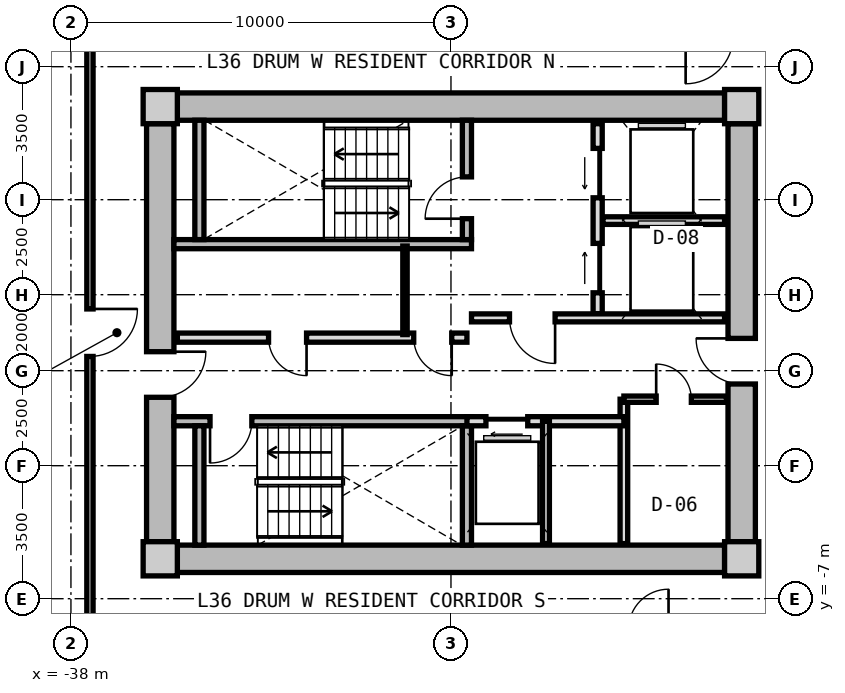
"""IFC4 building model, lengths in metres.
Left out: names, types, materials, properties, quantities, classifications, styles, units other than length and angle.
Written with IfcOpenShell. Run it as: python <this file> out.ifc"""

import sys

from ifc_helpers import new_model, si_unit, direction, frame, frame_2d, origin, origin_2d, place, context, subcontext, project, spatial, rectangle, extrude, source, transform, mapped, element, fill, save


model = new_model("IFC4")
c1 = context("Model", 3, precision=1e-05, world=origin(), true_north=direction((0.0, 1.0)))
c2 = subcontext(c1, "Body", "Model", "MODEL_VIEW")
j1 = project(units=[si_unit("LENGTHUNIT", "METRE"), si_unit("PLANEANGLEUNIT", "RADIAN")], contexts=[c1])
p1 = place(None, origin())
s1 = spatial("IfcSite", under=j1, at=p1, CompositionType="ELEMENT")
p2 = place(p1, origin())
s2 = spatial("IfcBuilding", under=s1, at=p2, CompositionType="ELEMENT")
p3 = place(p2, frame((0.0, 0.0, 117.6)))
s3 = spatial("IfcBuildingStorey", under=s2, at=p3, CompositionType="ELEMENT", Elevation=117.6)
m1 = source(origin(), c2, "Body", "SweptSolid", [
    extrude(rectangle(XDim=0.9, YDim=0.9, at=origin_2d()), origin(), (0.0, 0.0, 1.0), 3.05),
])
for number, where, z_axis, x_axis in (
    (1, (-35.65, -5.95, 0.0), (0.0, 0.0, 1.0), (1.0, 0.0, 0.0)),
    (2, (-20.35, -5.95, 0.0), (0.0, 0.0, 1.0), (1.0, 0.0, 0.0)),
    (3, (-20.35, 5.95, 0.0), (0.0, 0.0, 1.0), (1.0, 0.0, 0.0)),
    (4, (-35.65, 5.95, 0.0), (0.0, 0.0, 1.0), (1.0, 0.0, 0.0)),
):
    element("IfcColumn", number, at=place(p3, frame(where, z_axis=z_axis, x_axis=x_axis)), inside=s3, PredefinedType="COLUMN", context=c2, shape_type="MappedRepresentation", body=[
        mapped(m1, transform((0.0, 0.0, 0.0), x_axis=(1.0, 0.0, 0.0), y_axis=(0.0, 1.0, 0.0), z_axis=(0.0, 0.0, 1.0), scale=1.0)),
    ])
m2 = source(origin(), c2, "Body", "SweptSolid", [
    extrude(rectangle(XDim=14.4, YDim=0.72, at=frame_2d((7.2, 0.0))), origin(), (0.0, 0.0, 1.0), 2.79),
])
for number, where, z_axis, x_axis in (
    (5, (-35.2, 5.95, 0.0), (0.0, 0.0, 1.0), (1.0, 0.0, 0.0)),
    (6, (-20.8, -5.95, 0.0), (0.0, 0.0, 1.0), (-1.0, 0.0, 0.0)),
):
    element("IfcWall", number, at=place(p3, frame(where, z_axis=z_axis, x_axis=x_axis)), inside=s3, PredefinedType="SHEAR", context=c2, shape_type="MappedRepresentation", body=[
        mapped(m2, transform((0.0, 0.0, 0.0), x_axis=(1.0, 0.0, 0.0), y_axis=(0.0, 1.0, 0.0), z_axis=(0.0, 0.0, 1.0), scale=1.0)),
    ])
m3 = source(origin(), c2, "Body", "SweptSolid", [
    extrude(rectangle(XDim=11.0, YDim=0.72, at=frame_2d((5.5, 0.0))), origin(), (0.0, 0.0, 1.0), 2.79),
])
p4 = place(p3, frame((-35.65, -5.5, 0.0), z_axis=(0.0, 0.0, 1.0), x_axis=(0.0, 1.0, 0.0)))
e7 = element("IfcWall", 7, at=p4, inside=s3, PredefinedType="SHEAR", context=c2, shape_type="MappedRepresentation", body=[
    mapped(m3, transform((0.0, 0.0, 0.0), x_axis=(1.0, 0.0, 0.0), y_axis=(0.0, 1.0, 0.0), z_axis=(0.0, 0.0, 1.0), scale=1.0)),
])
p5 = place(p4, frame((3.8, 0.0, 0.0)))
e8 = element("IfcOpeningElement", 8, at=p5, cuts=e7, PredefinedType="OPENING", context=c2, shape_type="SweptSolid", body=[
    extrude(rectangle(XDim=1.2, YDim=2.15, at=frame_2d((0.6, 1.075))), frame((0.0, 0.37, 0.0), z_axis=(0.0, -1.0, 0.0), x_axis=(1.0, 0.0, 0.0)), (0.0, 0.0, 1.0), 0.74),
])
p6 = place(p3, frame((-20.35, 5.5, 0.0), z_axis=(0.0, 0.0, 1.0), x_axis=(0.0, -1.0, 0.0)))
e9 = element("IfcWall", 9, at=p6, inside=s3, PredefinedType="SHEAR", context=c2, shape_type="MappedRepresentation", body=[
    mapped(m3, transform((0.0, 0.0, 0.0), x_axis=(1.0, 0.0, 0.0), y_axis=(0.0, 1.0, 0.0), z_axis=(0.0, 0.0, 1.0), scale=1.0)),
])
p7 = place(p6, frame((5.65, 0.0, 0.0)))
e10 = element("IfcOpeningElement", 10, at=p7, cuts=e9, PredefinedType="OPENING", context=c2, shape_type="SweptSolid", body=[
    extrude(rectangle(XDim=1.2, YDim=2.15, at=frame_2d((0.6, 1.075))), frame((0.0, 0.37, 0.0), z_axis=(0.0, -1.0, 0.0), x_axis=(1.0, 0.0, 0.0)), (0.0, 0.0, 1.0), 0.74),
])
m4 = source(origin(), c2, "Body", "SweptSolid", [
    extrude(rectangle(XDim=7.83, YDim=0.24, at=frame_2d((3.915, 0.0))), origin(), (0.0, 0.0, 1.0), 2.79),
])
p8 = place(p3, frame((-35.29, 2.33, 0.0), z_axis=(0.0, 0.0, 1.0), x_axis=(1.0, 0.0, 0.0)))
e11 = element("IfcWall", 11, at=p8, inside=s3, PredefinedType="PARTITIONING", context=c2, shape_type="MappedRepresentation", body=[
    mapped(m4, transform((0.0, 0.0, 0.0), x_axis=(1.0, 0.0, 0.0), y_axis=(0.0, 1.0, 0.0), z_axis=(0.0, 0.0, 1.0), scale=1.0)),
])
m5 = source(origin(), c2, "Body", "SweptSolid", [
    extrude(rectangle(XDim=3.14, YDim=0.24, at=frame_2d((1.57, 0.0))), origin(), (0.0, 0.0, 1.0), 2.79),
])
p9 = place(p3, frame((-34.62, 2.45, 0.0), z_axis=(0.0, 0.0, 1.0), x_axis=(0.0, 1.0, 0.0)))
e12 = element("IfcWall", 12, at=p9, inside=s3, PredefinedType="PARTITIONING", context=c2, shape_type="MappedRepresentation", body=[
    mapped(m5, transform((0.0, 0.0, 0.0), x_axis=(1.0, 0.0, 0.0), y_axis=(0.0, 1.0, 0.0), z_axis=(0.0, 0.0, 1.0), scale=1.0)),
])
p10 = place(p3, frame((-27.58, 2.45, 0.0), z_axis=(0.0, 0.0, 1.0), x_axis=(0.0, 1.0, 0.0)))
e13 = element("IfcWall", 13, at=p10, inside=s3, PredefinedType="PARTITIONING", context=c2, shape_type="MappedRepresentation", body=[
    mapped(m5, transform((0.0, 0.0, 0.0), x_axis=(1.0, 0.0, 0.0), y_axis=(0.0, 1.0, 0.0), z_axis=(0.0, 0.0, 1.0), scale=1.0)),
])
p11 = place(p10, frame((0.55, 0.0, 0.0)))
e14 = element("IfcOpeningElement", 14, at=p11, cuts=e13, PredefinedType="OPENING", context=c2, shape_type="SweptSolid", body=[
    extrude(rectangle(XDim=1.1, YDim=2.15, at=frame_2d((0.55, 1.075))), frame((0.0, 0.13, 0.0), z_axis=(0.0, -1.0, 0.0), x_axis=(1.0, 0.0, 0.0)), (0.0, 0.0, 1.0), 0.26),
])
p12 = place(p3, frame((-35.29, -2.33, 0.0), z_axis=(0.0, 0.0, 1.0), x_axis=(1.0, 0.0, 0.0)))
e15 = element("IfcWall", 15, at=p12, inside=s3, PredefinedType="PARTITIONING", context=c2, shape_type="MappedRepresentation", body=[
    mapped(m4, transform((0.0, 0.0, 0.0), x_axis=(1.0, 0.0, 0.0), y_axis=(0.0, 1.0, 0.0), z_axis=(0.0, 0.0, 1.0), scale=1.0)),
])
p13 = place(p12, frame((0.95, 0.0, 0.0)))
e16 = element("IfcOpeningElement", 16, at=p13, cuts=e15, PredefinedType="OPENING", context=c2, shape_type="SweptSolid", body=[
    extrude(rectangle(XDim=1.1, YDim=2.15, at=frame_2d((0.55, 1.075))), frame((0.0, 0.13, 0.0), z_axis=(0.0, -1.0, 0.0), x_axis=(1.0, 0.0, 0.0)), (0.0, 0.0, 1.0), 0.26),
])
for number, where, z_axis, x_axis in (
    (17, (-34.62, -5.59, 0.0), (0.0, 0.0, 1.0), (0.0, 1.0, 0.0)),
    (18, (-27.58, -5.59, 0.0), (0.0, 0.0, 1.0), (0.0, 1.0, 0.0)),
):
    element("IfcWall", number, at=place(p3, frame(where, z_axis=z_axis, x_axis=x_axis)), inside=s3, PredefinedType="PARTITIONING", context=c2, shape_type="MappedRepresentation", body=[
        mapped(m5, transform((0.0, 0.0, 0.0), x_axis=(1.0, 0.0, 0.0), y_axis=(0.0, 1.0, 0.0), z_axis=(0.0, 0.0, 1.0), scale=1.0)),
    ])
m6 = source(origin(), c2, "Body", "SweptSolid", [
    extrude(rectangle(XDim=5.0, YDim=0.24, at=frame_2d((2.5, 0.0))), origin(), (0.0, 0.0, 1.0), 2.775),
])
p14 = place(p3, frame((-24.14, 0.5, 0.0), z_axis=(0.0, 0.0, 1.0), x_axis=(0.0, 1.0, 0.0)))
e19 = element("IfcWall", 19, at=p14, inside=s3, PredefinedType="PARTITIONING", context=c2, shape_type="MappedRepresentation", body=[
    mapped(m6, transform((0.0, 0.0, 0.0), x_axis=(1.0, 0.0, 0.0), y_axis=(0.0, 1.0, 0.0), z_axis=(0.0, 0.0, 1.0), scale=1.0)),
])
p15 = place(p14, frame((3.05, 0.0, 0.0)))
e20 = element("IfcOpeningElement", 20, at=p15, cuts=e19, PredefinedType="OPENING", context=c2, shape_type="SweptSolid", body=[
    extrude(rectangle(XDim=1.3, YDim=2.2, at=frame_2d((0.65, 1.1))), frame((0.0, 0.13, 0.0), z_axis=(0.0, -1.0, 0.0), x_axis=(1.0, 0.0, 0.0)), (0.0, 0.0, 1.0), 0.26),
])
p16 = place(p14, frame((0.55, 0.0, 0.0)))
e21 = element("IfcOpeningElement", 21, at=p16, cuts=e19, PredefinedType="OPENING", context=c2, shape_type="SweptSolid", body=[
    extrude(rectangle(XDim=1.3, YDim=2.2, at=frame_2d((0.65, 1.1))), frame((0.0, 0.13, 0.0), z_axis=(0.0, -1.0, 0.0), x_axis=(1.0, 0.0, 0.0)), (0.0, 0.0, 1.0), 0.26),
])
m7 = source(origin(), c2, "Body", "SweptSolid", [
    extrude(rectangle(XDim=3.2, YDim=0.2, at=frame_2d((1.6, 0.0))), origin(), (0.0, 0.0, 1.0), 2.775),
])
p17 = place(p3, frame((-24.0, 2.95, 0.0), z_axis=(0.0, 0.0, 1.0), x_axis=(1.0, 0.0, 0.0)))
e22 = element("IfcWall", 22, at=p17, inside=s3, PredefinedType="PARTITIONING", context=c2, shape_type="MappedRepresentation", body=[
    mapped(m7, transform((0.0, 0.0, 0.0), x_axis=(1.0, 0.0, 0.0), y_axis=(0.0, 1.0, 0.0), z_axis=(0.0, 0.0, 1.0), scale=1.0)),
])
m8 = source(origin(), c2, "Body", "SweptSolid", [
    extrude(rectangle(XDim=6.66, YDim=0.21, at=frame_2d((3.33, 0.0))), origin(), (0.0, 0.0, 1.0), 2.775),
])
p18 = place(p3, frame((-27.46, 0.39, 0.0), z_axis=(0.0, 0.0, 1.0), x_axis=(1.0, 0.0, 0.0)))
e23 = element("IfcWall", 23, at=p18, inside=s3, PredefinedType="PARTITIONING", context=c2, shape_type="MappedRepresentation", body=[
    mapped(m8, transform((0.0, 0.0, 0.0), x_axis=(1.0, 0.0, 0.0), y_axis=(0.0, 1.0, 0.0), z_axis=(0.0, 0.0, 1.0), scale=1.0)),
])
p19 = place(p18, frame((1.0, 0.0, 0.0)))
e24 = element("IfcOpeningElement", 24, at=p19, cuts=e23, PredefinedType="OPENING", context=c2, shape_type="SweptSolid", body=[
    extrude(rectangle(XDim=1.2, YDim=2.15, at=frame_2d((0.6, 1.075))), frame((0.0, 0.115, 0.0), z_axis=(0.0, -1.0, 0.0), x_axis=(1.0, 0.0, 0.0)), (0.0, 0.0, 1.0), 0.23),
])
m9 = source(origin(), c2, "Body", "SweptSolid", [
    extrude(rectangle(XDim=7.62, YDim=0.24, at=frame_2d((3.81, 0.0))), origin(), (0.0, 0.0, 1.0), 2.775),
])
p20 = place(p3, frame((-35.2, -0.13, 0.0), z_axis=(0.0, 0.0, 1.0), x_axis=(1.0, 0.0, 0.0)))
e25 = element("IfcWall", 25, at=p20, inside=s3, PredefinedType="PARTITIONING", context=c2, shape_type="MappedRepresentation", body=[
    mapped(m9, transform((0.0, 0.0, 0.0), x_axis=(1.0, 0.0, 0.0), y_axis=(0.0, 1.0, 0.0), z_axis=(0.0, 0.0, 1.0), scale=1.0)),
])
p21 = place(p20, frame((6.22, 0.0, 0.0)))
e26 = element("IfcOpeningElement", 26, at=p21, cuts=e25, PredefinedType="OPENING", context=c2, shape_type="SweptSolid", body=[
    extrude(rectangle(XDim=1.0, YDim=2.1, at=frame_2d((0.5, 1.05))), frame((0.0, 0.13, 0.0), z_axis=(0.0, -1.0, 0.0), x_axis=(1.0, 0.0, 0.0)), (0.0, 0.0, 1.0), 0.26),
])
p22 = place(p20, frame((2.4, 0.0, 0.0)))
e27 = element("IfcOpeningElement", 27, at=p22, cuts=e25, PredefinedType="OPENING", context=c2, shape_type="SweptSolid", body=[
    extrude(rectangle(XDim=1.0, YDim=2.1, at=frame_2d((0.5, 1.05))), frame((0.0, 0.13, 0.0), z_axis=(0.0, -1.0, 0.0), x_axis=(1.0, 0.0, 0.0)), (0.0, 0.0, 1.0), 0.26),
])
m10 = source(origin(), c2, "Body", "SweptSolid", [
    extrude(rectangle(XDim=2.33, YDim=0.115, at=frame_2d((1.165, 0.0))), origin(), (0.0, 0.0, 1.0), 2.775),
])
p23 = place(p3, frame((-29.21, -0.05, 0.0), z_axis=(0.0, 0.0, 1.0), x_axis=(0.0, 1.0, 0.0)))
e28 = element("IfcWall", 28, at=p23, inside=s3, PredefinedType="PARTITIONING", context=c2, shape_type="MappedRepresentation", body=[
    mapped(m10, transform((0.0, 0.0, 0.0), x_axis=(1.0, 0.0, 0.0), y_axis=(0.0, 1.0, 0.0), z_axis=(0.0, 0.0, 1.0), scale=1.0)),
])
m11 = source(origin(), c2, "Body", "SweptSolid", [
    extrude(rectangle(XDim=3.8, YDim=0.2, at=frame_2d((1.9, 0.0))), origin(), (0.0, 0.0, 1.0), 2.775),
])
p24 = place(p3, frame((-23.45, -5.55, 0.0), z_axis=(0.0, 0.0, 1.0), x_axis=(0.0, 1.0, 0.0)))
e29 = element("IfcWall", 29, at=p24, inside=s3, PredefinedType="PARTITIONING", context=c2, shape_type="MappedRepresentation", body=[
    mapped(m11, transform((0.0, 0.0, 0.0), x_axis=(1.0, 0.0, 0.0), y_axis=(0.0, 1.0, 0.0), z_axis=(0.0, 0.0, 1.0), scale=1.0)),
])
m12 = source(origin(), c2, "Body", "SweptSolid", [
    extrude(rectangle(XDim=4.13, YDim=0.24, at=frame_2d((2.065, 0.0))), origin(), (0.0, 0.0, 1.0), 2.775),
])
p25 = place(p3, frame((-27.58, -2.33, 0.0), z_axis=(0.0, 0.0, 1.0), x_axis=(1.0, 0.0, 0.0)))
e30 = element("IfcWall", 30, at=p25, inside=s3, PredefinedType="PARTITIONING", context=c2, shape_type="MappedRepresentation", body=[
    mapped(m12, transform((0.0, 0.0, 0.0), x_axis=(1.0, 0.0, 0.0), y_axis=(0.0, 1.0, 0.0), z_axis=(0.0, 0.0, 1.0), scale=1.0)),
])
p26 = place(p25, frame((0.5, 0.0, 0.0)))
e31 = element("IfcOpeningElement", 31, at=p26, cuts=e30, PredefinedType="OPENING", context=c2, shape_type="SweptSolid", body=[
    extrude(rectangle(XDim=1.1, YDim=2.2, at=frame_2d((0.55, 1.1))), frame((0.0, 0.13, 0.0), z_axis=(0.0, -1.0, 0.0), x_axis=(1.0, 0.0, 0.0)), (0.0, 0.0, 1.0), 0.26),
])
m13 = source(origin(), c2, "Body", "SweptSolid", [
    extrude(rectangle(XDim=3.22, YDim=0.18, at=frame_2d((1.61, 0.0))), origin(), (0.0, 0.0, 1.0), 2.775),
])
p27 = place(p3, frame((-25.5, -5.55, 0.0), z_axis=(0.0, 0.0, 1.0), x_axis=(0.0, 1.0, 0.0)))
e32 = element("IfcWall", 32, at=p27, inside=s3, PredefinedType="PARTITIONING", context=c2, shape_type="MappedRepresentation", body=[
    mapped(m13, transform((0.0, 0.0, 0.0), x_axis=(1.0, 0.0, 0.0), y_axis=(0.0, 1.0, 0.0), z_axis=(0.0, 0.0, 1.0), scale=1.0)),
])
m14 = source(origin(), c2, "Body", "SweptSolid", [
    extrude(rectangle(XDim=2.7, YDim=0.165, at=frame_2d((1.35, 0.0))), origin(), (0.0, 0.0, 1.0), 2.775),
])
p28 = place(p3, frame((-23.45, -1.75, 0.0), z_axis=(0.0, 0.0, 1.0), x_axis=(1.0, 0.0, 0.0)))
e33 = element("IfcWall", 33, at=p28, inside=s3, PredefinedType="PARTITIONING", context=c2, shape_type="MappedRepresentation", body=[
    mapped(m14, transform((0.0, 0.0, 0.0), x_axis=(1.0, 0.0, 0.0), y_axis=(0.0, 1.0, 0.0), z_axis=(0.0, 0.0, 1.0), scale=1.0)),
])
p29 = place(p28, frame((0.85, 0.0, 0.0)))
e34 = element("IfcOpeningElement", 34, at=p29, cuts=e33, PredefinedType="OPENING", context=c2, shape_type="SweptSolid", body=[
    extrude(rectangle(XDim=0.925, YDim=2.1, at=frame_2d((0.462, 1.05))), frame((0.0, 0.093, 0.0), z_axis=(0.0, -1.0, 0.0), x_axis=(1.0, 0.0, 0.0)), (0.0, 0.0, 1.0), 0.185),
])
m15 = source(origin(), c2, "Body", "SweptSolid", [
    extrude(rectangle(XDim=15.6, YDim=0.165, at=frame_2d((7.8, 0.0))), origin(), (0.0, 0.0, 1.0), 2.775),
])
p30 = place(p3, frame((-37.5, -7.8, 0.0), z_axis=(0.0, 0.0, 1.0), x_axis=(0.0, 1.0, 0.0)))
e35 = element("IfcWall", 35, at=p30, inside=s3, PredefinedType="PARTITIONING", context=c2, shape_type="MappedRepresentation", body=[
    mapped(m15, transform((0.0, 0.0, 0.0), x_axis=(1.0, 0.0, 0.0), y_axis=(0.0, 1.0, 0.0), z_axis=(0.0, 0.0, 1.0), scale=1.0)),
])
p31 = place(p30, frame((7.175, 0.0, 0.0)))
e36 = element("IfcOpeningElement", 36, at=p31, cuts=e35, PredefinedType="OPENING", context=c2, shape_type="SweptSolid", body=[
    extrude(rectangle(XDim=1.25, YDim=2.2, at=frame_2d((0.625, 1.1))), frame((0.0, 0.093, 0.0), z_axis=(0.0, -1.0, 0.0), x_axis=(1.0, 0.0, 0.0)), (0.0, 0.0, 1.0), 0.185),
])
m16 = source(origin(), c2, "Body", "SweptSolid", [
    extrude(rectangle(XDim=1.1, YDim=2.15, at=frame_2d((0.55, 1.075))), frame((0.0, 0.025, 0.0), z_axis=(0.0, -1.0, 0.0), x_axis=(1.0, 0.0, 0.0)), (0.0, 0.0, 1.0), 0.05),
])
p32 = place(p11, origin())
e37 = element("IfcDoor", 37, at=p32, inside=s3, OperationType="SINGLE_SWING_LEFT", PredefinedType="DOOR", context=c2, shape_type="MappedRepresentation", body=[
    mapped(m16, transform((0.0, 0.0, 0.0), x_axis=(1.0, 0.0, 0.0), y_axis=(0.0, 1.0, 0.0), z_axis=(0.0, 0.0, 1.0), scale=1.0)),
])
fill(e14, e37)
p33 = place(p13, frame((1.1, 0.0, 0.0), z_axis=(0.0, 0.0, 1.0), x_axis=(-1.0, 0.0, 0.0)))
e38 = element("IfcDoor", 38, at=p33, inside=s3, OperationType="SINGLE_SWING_RIGHT", PredefinedType="DOOR", context=c2, shape_type="MappedRepresentation", body=[
    mapped(m16, transform((0.0, 0.0, 0.0), x_axis=(1.0, 0.0, 0.0), y_axis=(0.0, 1.0, 0.0), z_axis=(0.0, 0.0, 1.0), scale=1.0)),
])
fill(e16, e38)
m17 = source(origin(), c2, "Body", "SweptSolid", [
    extrude(rectangle(XDim=1.3, YDim=2.2, at=frame_2d((0.65, 1.1))), frame((0.0, 0.025, 0.0), z_axis=(0.0, -1.0, 0.0), x_axis=(1.0, 0.0, 0.0)), (0.0, 0.0, 1.0), 0.05),
])
p34 = place(p15, origin())
e39 = element("IfcDoor", 39, at=p34, inside=s3, OperationType="SLIDING_TO_LEFT", PredefinedType="DOOR", context=c2, shape_type="MappedRepresentation", body=[
    mapped(m17, transform((0.0, 0.0, 0.0), x_axis=(1.0, 0.0, 0.0), y_axis=(0.0, 1.0, 0.0), z_axis=(0.0, 0.0, 1.0), scale=1.0)),
])
fill(e20, e39)
p35 = place(p16, origin())
e40 = element("IfcDoor", 40, at=p35, inside=s3, OperationType="SLIDING_TO_RIGHT", PredefinedType="DOOR", context=c2, shape_type="MappedRepresentation", body=[
    mapped(m17, transform((0.0, 0.0, 0.0), x_axis=(1.0, 0.0, 0.0), y_axis=(0.0, 1.0, 0.0), z_axis=(0.0, 0.0, 1.0), scale=1.0)),
])
fill(e21, e40)
m18 = source(origin(), c2, "Body", "SweptSolid", [
    extrude(rectangle(XDim=1.2, YDim=2.15, at=frame_2d((0.6, 1.075))), frame((0.0, 0.025, 0.0), z_axis=(0.0, -1.0, 0.0), x_axis=(1.0, 0.0, 0.0)), (0.0, 0.0, 1.0), 0.05),
])
p36 = place(p19, frame((1.2, 0.0, 0.0), z_axis=(0.0, 0.0, 1.0), x_axis=(-1.0, 0.0, 0.0)))
e41 = element("IfcDoor", 41, at=p36, inside=s3, OperationType="SINGLE_SWING_LEFT", PredefinedType="DOOR", context=c2, shape_type="MappedRepresentation", body=[
    mapped(m18, transform((0.0, 0.0, 0.0), x_axis=(1.0, 0.0, 0.0), y_axis=(0.0, 1.0, 0.0), z_axis=(0.0, 0.0, 1.0), scale=1.0)),
])
fill(e24, e41)
p37 = place(p5, frame((1.2, 0.0, 0.0), z_axis=(0.0, 0.0, 1.0), x_axis=(-1.0, 0.0, 0.0)))
e42 = element("IfcDoor", 42, at=p37, inside=s3, OperationType="SINGLE_SWING_LEFT", PredefinedType="DOOR", context=c2, shape_type="MappedRepresentation", body=[
    mapped(m18, transform((0.0, 0.0, 0.0), x_axis=(1.0, 0.0, 0.0), y_axis=(0.0, 1.0, 0.0), z_axis=(0.0, 0.0, 1.0), scale=1.0)),
])
fill(e8, e42)
p38 = place(p7, frame((1.2, 0.0, 0.0), z_axis=(0.0, 0.0, 1.0), x_axis=(-1.0, 0.0, 0.0)))
e43 = element("IfcDoor", 43, at=p38, inside=s3, OperationType="SINGLE_SWING_RIGHT", PredefinedType="DOOR", context=c2, shape_type="MappedRepresentation", body=[
    mapped(m18, transform((0.0, 0.0, 0.0), x_axis=(1.0, 0.0, 0.0), y_axis=(0.0, 1.0, 0.0), z_axis=(0.0, 0.0, 1.0), scale=1.0)),
])
fill(e10, e43)
m19 = source(origin(), c2, "Body", "SweptSolid", [
    extrude(rectangle(XDim=1.0, YDim=2.1, at=frame_2d((0.5, 1.05))), frame((0.0, 0.025, 0.0), z_axis=(0.0, -1.0, 0.0), x_axis=(1.0, 0.0, 0.0)), (0.0, 0.0, 1.0), 0.05),
])
p39 = place(p21, frame((1.0, 0.0, 0.0), z_axis=(0.0, 0.0, 1.0), x_axis=(-1.0, 0.0, 0.0)))
e44 = element("IfcDoor", 44, at=p39, inside=s3, OperationType="SINGLE_SWING_LEFT", PredefinedType="DOOR", context=c2, shape_type="MappedRepresentation", body=[
    mapped(m19, transform((0.0, 0.0, 0.0), x_axis=(1.0, 0.0, 0.0), y_axis=(0.0, 1.0, 0.0), z_axis=(0.0, 0.0, 1.0), scale=1.0)),
])
fill(e26, e44)
p40 = place(p22, frame((1.0, 0.0, 0.0), z_axis=(0.0, 0.0, 1.0), x_axis=(-1.0, 0.0, 0.0)))
e45 = element("IfcDoor", 45, at=p40, inside=s3, OperationType="SINGLE_SWING_LEFT", PredefinedType="DOOR", context=c2, shape_type="MappedRepresentation", body=[
    mapped(m19, transform((0.0, 0.0, 0.0), x_axis=(1.0, 0.0, 0.0), y_axis=(0.0, 1.0, 0.0), z_axis=(0.0, 0.0, 1.0), scale=1.0)),
])
fill(e27, e45)
m20 = source(origin(), c2, "Body", "SweptSolid", [
    extrude(rectangle(XDim=1.1, YDim=2.2, at=frame_2d((0.55, 1.1))), frame((0.0, 0.025, 0.0), z_axis=(0.0, -1.0, 0.0), x_axis=(1.0, 0.0, 0.0)), (0.0, 0.0, 1.0), 0.05),
])
p41 = place(p26, frame((1.1, 0.0, 0.0), z_axis=(0.0, 0.0, 1.0), x_axis=(-1.0, 0.0, 0.0)))
e46 = element("IfcDoor", 46, at=p41, inside=s3, OperationType="SLIDING_TO_LEFT", PredefinedType="DOOR", context=c2, shape_type="MappedRepresentation", body=[
    mapped(m20, transform((0.0, 0.0, 0.0), x_axis=(1.0, 0.0, 0.0), y_axis=(0.0, 1.0, 0.0), z_axis=(0.0, 0.0, 1.0), scale=1.0)),
])
fill(e31, e46)
m21 = source(origin(), c2, "Body", "SweptSolid", [
    extrude(rectangle(XDim=0.925, YDim=2.1, at=frame_2d((0.462, 1.05))), frame((0.0, 0.025, 0.0), z_axis=(0.0, -1.0, 0.0), x_axis=(1.0, 0.0, 0.0)), (0.0, 0.0, 1.0), 0.05),
])
p42 = place(p29, origin())
e47 = element("IfcDoor", 47, at=p42, inside=s3, OperationType="SINGLE_SWING_LEFT", PredefinedType="DOOR", context=c2, shape_type="MappedRepresentation", body=[
    mapped(m21, transform((0.0, 0.0, 0.0), x_axis=(1.0, 0.0, 0.0), y_axis=(0.0, 1.0, 0.0), z_axis=(0.0, 0.0, 1.0), scale=1.0)),
])
fill(e34, e47)
m22 = source(origin(), c2, "Body", "SweptSolid", [
    extrude(rectangle(XDim=1.25, YDim=2.2, at=frame_2d((0.625, 1.1))), frame((0.0, 0.025, 0.0), z_axis=(0.0, -1.0, 0.0), x_axis=(1.0, 0.0, 0.0)), (0.0, 0.0, 1.0), 0.05),
])
p43 = place(p31, frame((1.25, 0.0, 0.0), z_axis=(0.0, 0.0, 1.0), x_axis=(-1.0, 0.0, 0.0)))
e48 = element("IfcDoor", 48, at=p43, inside=s3, OperationType="SINGLE_SWING_LEFT", PredefinedType="DOOR", context=c2, shape_type="MappedRepresentation", body=[
    mapped(m22, transform((0.0, 0.0, 0.0), x_axis=(1.0, 0.0, 0.0), y_axis=(0.0, 1.0, 0.0), z_axis=(0.0, 0.0, 1.0), scale=1.0)),
])
fill(e36, e48)
save(model, sys.argv[1])
